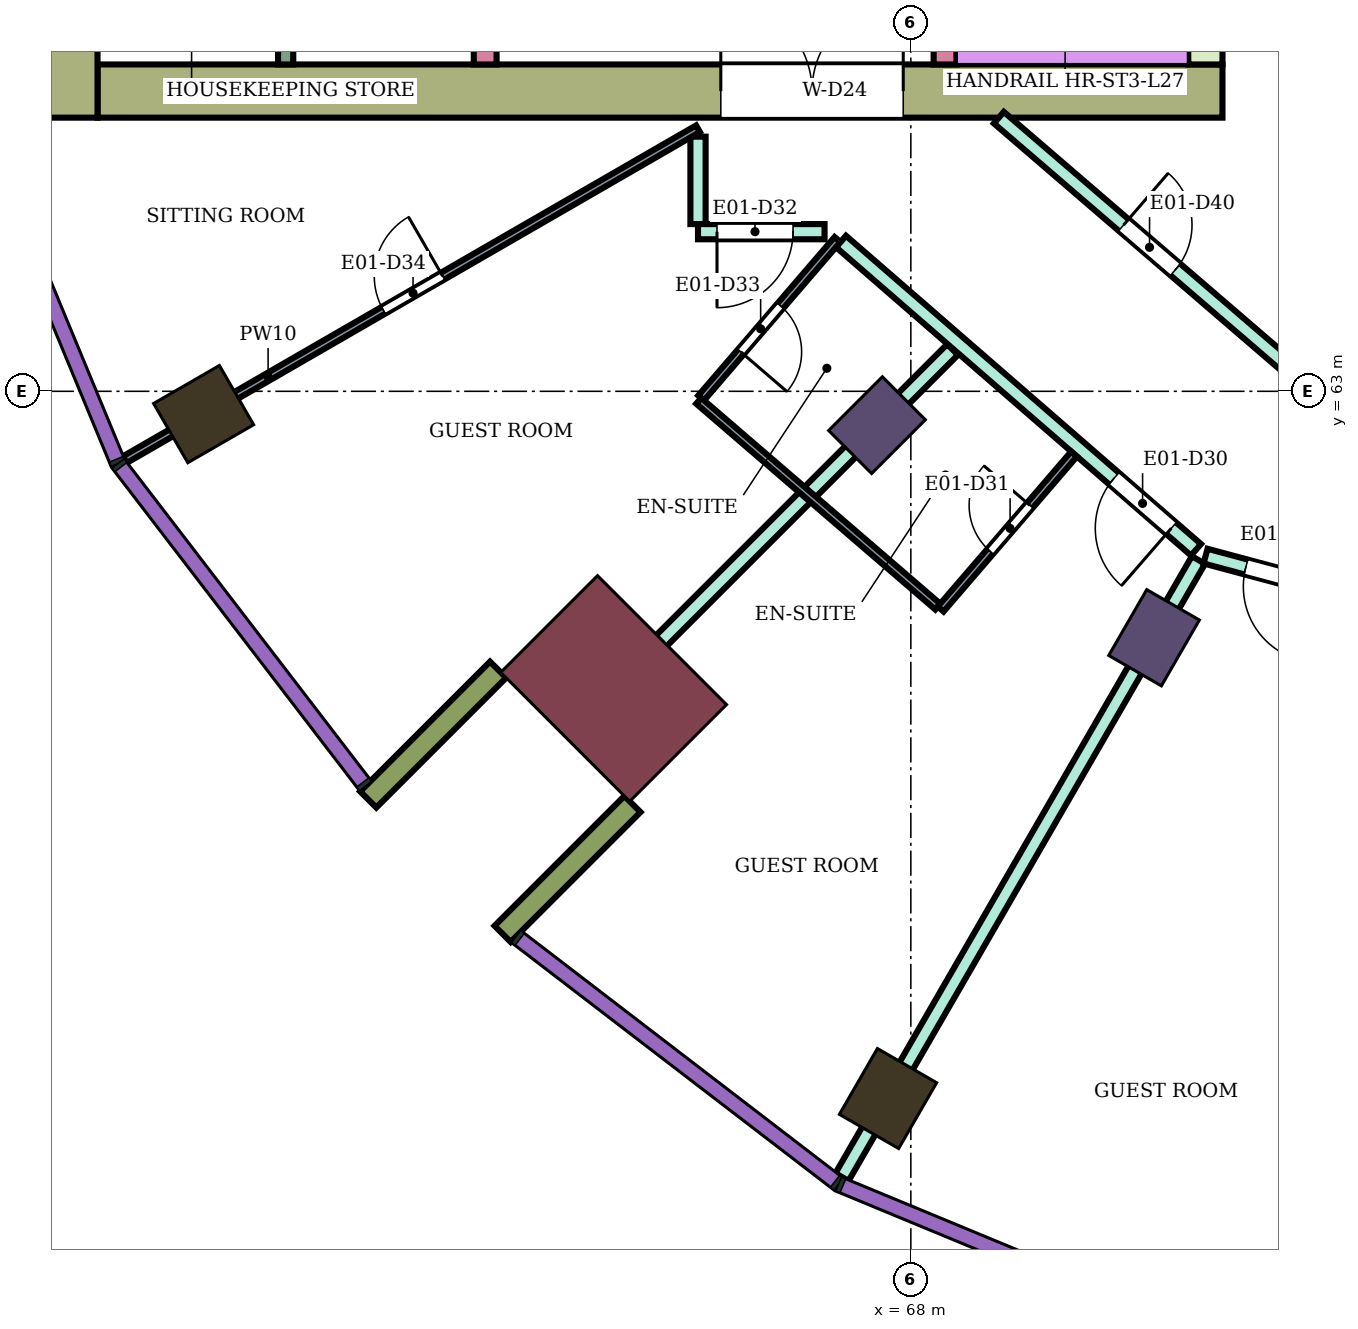
"""IFC4 building model, lengths in metres.
Left out: names, types, materials, properties, quantities, classifications, styles, units other than length and angle.
Written with IfcOpenShell. Run it as: python <this file> out.ifc"""

import sys

from ifc_helpers import new_model, si_unit, direction, frame, frame_2d, origin, origin_2d, place, context, subcontext, project, spatial, rectangle, extrude, element, fill, save


model = new_model("IFC4")
c1 = context("Model", 3, precision=1e-05, world=origin(), true_north=direction((0.0, 1.0)))
c2 = subcontext(c1, "Body", "Model", "MODEL_VIEW")
j1 = project(units=[si_unit("LENGTHUNIT", "METRE"), si_unit("PLANEANGLEUNIT", "RADIAN")], contexts=[c1])
p1 = place(None, origin())
s1 = spatial("IfcSite", under=j1, at=p1, CompositionType="ELEMENT")
p2 = place(p1, origin())
s2 = spatial("IfcBuilding", under=s1, at=p2, CompositionType="ELEMENT")
p3 = place(p2, frame((0.0, 0.0, 118.5)))
s3 = spatial("IfcBuildingStorey", under=s2, at=p3, CompositionType="ELEMENT", Elevation=118.5)
for number, where, z_axis, x_axis in (
    (1, (58.696, 62.7, 0.0), (0.0, 0.0, 1.0), (-0.866, -0.5, 0.0)),
    (2, (67.7, 53.696, 0.0), (0.0, 0.0, 1.0), (-0.5, -0.866, 0.0)),
):
    element("IfcColumn", number, at=place(p3, frame(where, z_axis=z_axis, x_axis=x_axis)), inside=s3, PredefinedType="COLUMN", context=c2, shape_type="SweptSolid", body=[
        extrude(rectangle(XDim=1.0, YDim=0.9, at=origin_2d()), origin(), (0.0, 0.0, 1.0), 3.9),
    ])
for number, where, z_axis, x_axis in (
    (3, (67.555, 62.555, 0.0), (0.0, 0.0, 1.0), (-0.707, -0.707, 0.0)),
    (4, (71.2, 59.758, 0.0), (0.0, 0.0, 1.0), (-0.5, -0.866, 0.0)),
):
    element("IfcColumn", number, at=place(p3, frame(where, z_axis=z_axis, x_axis=x_axis)), inside=s3, PredefinedType="COLUMN", context=c2, shape_type="SweptSolid", body=[
        extrude(rectangle(XDim=1.0, YDim=0.8, at=origin_2d()), origin(), (0.0, 0.0, 1.0), 3.9),
    ])
p4 = place(p3, frame((64.09, 59.09, 0.0), z_axis=(0.0, 0.0, 1.0), x_axis=(-0.707106781187, -0.707106781187, 0.0)))
e5 = element("IfcColumn", 5, at=p4, inside=s3, PredefinedType="COLUMN", context=c2, shape_type="SweptSolid", body=[
    extrude(rectangle(XDim=1.8, YDim=2.4, at=origin_2d()), origin(), (0.0, 0.0, 1.0), 3.9),
])
p5 = place(p3, frame((72.1, 66.95, 0.0), z_axis=(0.0, 0.0, 1.0), x_axis=(-1.0, 0.0, 0.0)))
e6 = element("IfcWall", 6, at=p5, inside=s3, PredefinedType="SHEAR", context=c2, shape_type="SweptSolid", body=[
    extrude(rectangle(XDim=14.8, YDim=0.7, at=frame_2d((7.4, 0.0))), origin(), (0.0, 0.0, 1.0), 3.58),
])
p6 = place(p5, frame((4.2, 0.0, 0.0)))
e7 = element("IfcOpeningElement", 7, at=p6, cuts=e6, PredefinedType="OPENING", context=c2, shape_type="SweptSolid", body=[
    extrude(rectangle(XDim=2.4, YDim=2.4, at=frame_2d((1.2, 1.2))), frame((0.0, 0.36, 0.0), z_axis=(0.0, -1.0, 0.0), x_axis=(1.0, 0.0, 0.0)), (0.0, 0.0, 1.0), 0.72),
])
p7 = place(p3, frame((71.875, 75.0, 0.0), z_axis=(0.0, 0.0, 1.0), x_axis=(0.0, -1.0, 0.0)))
e8 = element("IfcWall", 8, at=p7, inside=s3, PredefinedType="SHEAR", context=c2, shape_type="SweptSolid", body=[
    extrude(rectangle(XDim=7.7, YDim=0.45, at=frame_2d((3.85, 0.0))), origin(), (0.0, 0.0, 1.0), 3.58),
])
p8 = place(p3, frame((56.95, 83.4, 0.0), z_axis=(0.0, 0.0, 1.0), x_axis=(0.0, -1.0, 0.0)))
e9 = element("IfcWall", 9, at=p8, inside=s3, PredefinedType="SHEAR", context=c2, shape_type="SweptSolid", body=[
    extrude(rectangle(XDim=16.8, YDim=0.7, at=frame_2d((8.4, 0.0))), origin(), (0.0, 0.0, 1.0), 3.58),
])
p9 = place(p3, frame((68.45, 75.0, 0.0), z_axis=(0.0, 0.0, 1.0), x_axis=(0.0, -1.0, 0.0)))
e10 = element("IfcWall", 10, at=p9, inside=s3, PredefinedType="SHEAR", context=c2, shape_type="SweptSolid", body=[
    extrude(rectangle(XDim=7.7, YDim=0.3, at=frame_2d((3.85, 0.0))), origin(), (0.0, 0.0, 1.0), 3.58),
])
p10 = place(p9, frame((1.85, 0.0, 0.0)))
e11 = element("IfcOpeningElement", 11, at=p10, cuts=e10, PredefinedType="OPENING", context=c2, shape_type="SweptSolid", body=[
    extrude(rectangle(XDim=0.9, YDim=2.1, at=frame_2d((0.45, 1.05))), frame((0.0, 0.16, 0.0), z_axis=(0.0, -1.0, 0.0), x_axis=(1.0, 0.0, 0.0)), (0.0, 0.0, 1.0), 0.32),
])
p11 = place(p3, frame((62.4, 71.25, 0.0), z_axis=(0.0, 0.0, 1.0), x_axis=(0.0, -1.0, 0.0)))
e12 = element("IfcWall", 12, at=p11, inside=s3, PredefinedType="SHEAR", context=c2, shape_type="SweptSolid", body=[
    extrude(rectangle(XDim=3.95, YDim=0.3, at=frame_2d((1.975, 0.0))), origin(), (0.0, 0.0, 1.0), 3.58),
])
for number, where, z_axis, x_axis in (
    (13, (62.57, 59.338, 0.0), (0.0, 0.0, 1.0), (-0.707, -0.707, 0.0)),
    (14, (64.338, 57.57, 0.0), (0.0, 0.0, 1.0), (-0.707, -0.707, 0.0)),
):
    element("IfcWall", number, at=place(p3, frame(where, z_axis=z_axis, x_axis=x_axis)), inside=s3, PredefinedType="NOTDEFINED", context=c2, shape_type="SweptSolid", body=[
        extrude(rectangle(XDim=2.416, YDim=0.3, at=frame_2d((1.208, 0.0))), origin(), (0.0, 0.0, 1.0), 3.9),
    ])
p12 = place(p3, frame((63.596, 58.596, 0.0), z_axis=(0.0, 0.0, 1.0), x_axis=(0.707106781187, 0.707106781187, 0.0)))
e15 = element("IfcWall", 15, at=p12, inside=s3, PredefinedType="PARTITIONING", context=c2, shape_type="SweptSolid", body=[
    extrude(rectangle(XDim=7.005, YDim=0.2, at=frame_2d((3.503, 0.0))), origin(), (0.0, 0.0, 1.0), 3.45),
])
p13 = place(p3, frame((65.2, 65.2, 0.0), z_axis=(0.0, 0.0, 1.0), x_axis=(0.0, 1.0, 0.0)))
e16 = element("IfcWall", 16, at=p13, inside=s3, PredefinedType="PARTITIONING", context=c2, shape_type="SweptSolid", body=[
    extrude(rectangle(XDim=1.15, YDim=0.2, at=frame_2d((0.575, 0.0))), origin(), (0.0, 0.0, 1.0), 3.45),
])
p14 = place(p3, frame((65.2, 65.1, 0.0), z_axis=(0.0, 0.0, 1.0), x_axis=(1.0, 0.0, 0.0)))
e17 = element("IfcWall", 17, at=p14, inside=s3, PredefinedType="PARTITIONING", context=c2, shape_type="SweptSolid", body=[
    extrude(rectangle(XDim=1.665, YDim=0.2, at=frame_2d((0.833, 0.0))), origin(), (0.0, 0.0, 1.0), 3.45),
])
p15 = place(p14, frame((0.25, 0.0, 0.0)))
e18 = element("IfcOpeningElement", 18, at=p15, cuts=e17, PredefinedType="OPENING", context=c2, shape_type="SweptSolid", body=[
    extrude(rectangle(XDim=1.0, YDim=2.1, at=frame_2d((0.5, 1.05))), frame((0.0, 0.11, 0.0), z_axis=(0.0, -1.0, 0.0), x_axis=(1.0, 0.0, 0.0)), (0.0, 0.0, 1.0), 0.22),
])
p16 = place(p3, frame((67.081, 64.971, 0.0), z_axis=(0.0, 0.0, 1.0), x_axis=(0.755031061605, -0.65568902386, 0.0)))
e19 = element("IfcWall", 19, at=p16, inside=s3, PredefinedType="PARTITIONING", context=c2, shape_type="SweptSolid", body=[
    extrude(rectangle(XDim=6.186, YDim=0.2, at=frame_2d((3.093, 0.0))), origin(), (0.0, 0.0, 1.0), 3.45),
])
p17 = place(p16, frame((4.755, 0.0, 0.0)))
e20 = element("IfcOpeningElement", 20, at=p17, cuts=e19, PredefinedType="OPENING", context=c2, shape_type="SweptSolid", body=[
    extrude(rectangle(XDim=1.0, YDim=2.1, at=frame_2d((0.5, 1.05))), frame((0.0, 0.11, 0.0), z_axis=(0.0, -1.0, 0.0), x_axis=(1.0, 0.0, 0.0)), (0.0, 0.0, 1.0), 0.22),
])
p18 = place(p3, frame((67.094, 52.663, 0.0), z_axis=(0.0, 0.0, 1.0), x_axis=(0.500228134253, 0.865893650342, 0.0)))
e21 = element("IfcWall", 21, at=p18, inside=s3, PredefinedType="PARTITIONING", context=c2, shape_type="SweptSolid", body=[
    extrude(rectangle(XDim=9.375, YDim=0.2, at=frame_2d((4.687, 0.0))), origin(), (0.0, 0.0, 1.0), 3.45),
])
p19 = place(p3, frame((69.158, 66.6, 0.0), z_axis=(0.0, 0.0, 1.0), x_axis=(0.758063092745, -0.652181222835, 0.0)))
e22 = element("IfcWall", 22, at=p19, inside=s3, PredefinedType="PARTITIONING", context=c2, shape_type="SweptSolid", body=[
    extrude(rectangle(XDim=5.16, YDim=0.2, at=frame_2d((2.58, 0.0))), origin(), (0.0, 0.0, 1.0), 3.45),
])
p20 = place(p19, frame((2.165, 0.0, 0.0)))
e23 = element("IfcOpeningElement", 23, at=p20, cuts=e22, PredefinedType="OPENING", context=c2, shape_type="SweptSolid", body=[
    extrude(rectangle(XDim=0.9, YDim=2.1, at=frame_2d((0.45, 1.05))), frame((0.0, 0.11, 0.0), z_axis=(0.0, -1.0, 0.0), x_axis=(1.0, 0.0, 0.0)), (0.0, 0.0, 1.0), 0.22),
])
p21 = place(p3, frame((71.877, 60.832, 0.0), z_axis=(0.0, 0.0, 1.0), x_axis=(0.965857276008, -0.259074742848, 0.0)))
e24 = element("IfcWall", 24, at=p21, inside=s3, PredefinedType="PARTITIONING", context=c2, shape_type="SweptSolid", body=[
    extrude(rectangle(XDim=8.36, YDim=0.2, at=frame_2d((4.18, 0.0))), origin(), (0.0, 0.0, 1.0), 3.45),
])
p22 = place(p21, frame((0.55, 0.0, 0.0)))
e25 = element("IfcOpeningElement", 25, at=p22, cuts=e24, PredefinedType="OPENING", context=c2, shape_type="SweptSolid", body=[
    extrude(rectangle(XDim=1.0, YDim=2.1, at=frame_2d((0.5, 1.05))), frame((0.0, 0.11, 0.0), z_axis=(0.0, -1.0, 0.0), x_axis=(1.0, 0.0, 0.0)), (0.0, 0.0, 1.0), 0.22),
])
p23 = place(p3, frame((57.659, 62.101, 0.0), z_axis=(0.0, 0.0, 1.0), x_axis=(0.86602264145, 0.500004784474, 0.0)))
e26 = element("IfcWall", 26, at=p23, inside=s3, PredefinedType="PARTITIONING", context=c2, shape_type="SweptSolid", body=[
    extrude(rectangle(XDim=8.708, YDim=0.1, at=frame_2d((4.354, 0.0))), origin(), (0.0, 0.0, 1.0), 3.45),
])
p24 = place(p23, frame((3.929, 0.0, 0.0)))
e27 = element("IfcOpeningElement", 27, at=p24, cuts=e26, PredefinedType="OPENING", context=c2, shape_type="SweptSolid", body=[
    extrude(rectangle(XDim=0.9, YDim=2.1, at=frame_2d((0.45, 1.05))), frame((0.0, 0.06, 0.0), z_axis=(0.0, -1.0, 0.0), x_axis=(1.0, 0.0, 0.0)), (0.0, 0.0, 1.0), 0.12),
])
p25 = place(p3, frame((65.242, 62.912, 0.0), z_axis=(0.0, 0.0, 1.0), x_axis=(0.652069888227, 0.758158862553, 0.0)))
e28 = element("IfcWall", 28, at=p25, inside=s3, PredefinedType="PARTITIONING", context=c2, shape_type="SweptSolid", body=[
    extrude(rectangle(XDim=2.75, YDim=0.1, at=frame_2d((1.375, 0.0))), origin(), (0.0, 0.0, 1.0), 3.45),
])
p26 = place(p25, frame((0.8, 0.0, 0.0)))
e29 = element("IfcOpeningElement", 29, at=p26, cuts=e28, PredefinedType="OPENING", context=c2, shape_type="SweptSolid", body=[
    extrude(rectangle(XDim=0.8, YDim=2.1, at=frame_2d((0.4, 1.05))), frame((0.0, 0.06, 0.0), z_axis=(0.0, -1.0, 0.0), x_axis=(1.0, 0.0, 0.0)), (0.0, 0.0, 1.0), 0.12),
])
p27 = place(p3, frame((65.209, 62.875, 0.0), z_axis=(0.0, 0.0, 1.0), x_axis=(0.757930378138, -0.652335451969, 0.0)))
e30 = element("IfcWall", 30, at=p27, inside=s3, PredefinedType="PARTITIONING", context=c2, shape_type="SweptSolid", body=[
    extrude(rectangle(XDim=4.15, YDim=0.1, at=frame_2d((2.075, 0.0))), origin(), (0.0, 0.0, 1.0), 3.45),
])
p28 = place(p3, frame((68.393, 60.135, 0.0), z_axis=(0.0, 0.0, 1.0), x_axis=(0.652061182569, 0.758166349944, 0.0)))
e31 = element("IfcWall", 31, at=p28, inside=s3, PredefinedType="PARTITIONING", context=c2, shape_type="SweptSolid", body=[
    extrude(rectangle(XDim=2.69, YDim=0.1, at=frame_2d((1.345, 0.0))), origin(), (0.0, 0.0, 1.0), 3.45),
])
p29 = place(p28, frame((1.0, 0.0, 0.0)))
e32 = element("IfcOpeningElement", 32, at=p29, cuts=e31, PredefinedType="OPENING", context=c2, shape_type="SweptSolid", body=[
    extrude(rectangle(XDim=0.8, YDim=2.1, at=frame_2d((0.4, 1.05))), frame((0.0, 0.06, 0.0), z_axis=(0.0, -1.0, 0.0), x_axis=(1.0, 0.0, 0.0)), (0.0, 0.0, 1.0), 0.12),
])
p30 = place(p3, frame((59.775, 70.95, 0.0), z_axis=(0.0, 0.0, 1.0), x_axis=(0.0, -1.0, 0.0)))
e33 = element("IfcWall", 33, at=p30, inside=s3, PredefinedType="PARTITIONING", context=c2, shape_type="SweptSolid", body=[
    extrude(rectangle(XDim=3.65, YDim=0.2, at=frame_2d((1.825, 0.0))), origin(), (0.0, 0.0, 1.0), 3.58),
])
p31 = place(p22, frame((1.0, 0.0, 0.0), z_axis=(0.0, 0.0, 1.0), x_axis=(-1.0, 0.0, 0.0)))
e34 = element("IfcDoor", 34, at=p31, inside=s3, OperationType="SINGLE_SWING_LEFT", PredefinedType="DOOR", context=c2, shape_type="SweptSolid", body=[
    extrude(rectangle(XDim=1.0, YDim=2.1, at=frame_2d((0.5, 1.05))), frame((0.0, 0.025, 0.0), z_axis=(0.0, -1.0, 0.0), x_axis=(1.0, 0.0, 0.0)), (0.0, 0.0, 1.0), 0.05),
])
fill(e25, e34)
p32 = place(p17, frame((1.0, 0.0, 0.0), z_axis=(0.0, 0.0, 1.0), x_axis=(-1.0, 0.0, 0.0)))
e35 = element("IfcDoor", 35, at=p32, inside=s3, OperationType="SINGLE_SWING_LEFT", PredefinedType="DOOR", context=c2, shape_type="SweptSolid", body=[
    extrude(rectangle(XDim=1.0, YDim=2.1, at=frame_2d((0.5, 1.05))), frame((0.0, 0.025, 0.0), z_axis=(0.0, -1.0, 0.0), x_axis=(1.0, 0.0, 0.0)), (0.0, 0.0, 1.0), 0.05),
])
fill(e20, e35)
p33 = place(p29, origin())
e36 = element("IfcDoor", 36, at=p33, inside=s3, OperationType="SINGLE_SWING_RIGHT", PredefinedType="DOOR", context=c2, shape_type="SweptSolid", body=[
    extrude(rectangle(XDim=0.8, YDim=2.1, at=frame_2d((0.4, 1.05))), frame((0.0, 0.025, 0.0), z_axis=(0.0, -1.0, 0.0), x_axis=(1.0, 0.0, 0.0)), (0.0, 0.0, 1.0), 0.05),
])
fill(e32, e36)
p34 = place(p15, frame((1.0, 0.0, 0.0), z_axis=(0.0, 0.0, 1.0), x_axis=(-1.0, 0.0, 0.0)))
e37 = element("IfcDoor", 37, at=p34, inside=s3, OperationType="SINGLE_SWING_RIGHT", PredefinedType="DOOR", context=c2, shape_type="SweptSolid", body=[
    extrude(rectangle(XDim=1.0, YDim=2.1, at=frame_2d((0.5, 1.05))), frame((0.0, 0.025, 0.0), z_axis=(0.0, -1.0, 0.0), x_axis=(1.0, 0.0, 0.0)), (0.0, 0.0, 1.0), 0.05),
])
fill(e18, e37)
p35 = place(p26, frame((0.8, 0.0, 0.0), z_axis=(0.0, 0.0, 1.0), x_axis=(-1.0, 0.0, 0.0)))
e38 = element("IfcDoor", 38, at=p35, inside=s3, OperationType="SINGLE_SWING_RIGHT", PredefinedType="DOOR", context=c2, shape_type="SweptSolid", body=[
    extrude(rectangle(XDim=0.8, YDim=2.1, at=frame_2d((0.4, 1.05))), frame((0.0, 0.025, 0.0), z_axis=(0.0, -1.0, 0.0), x_axis=(1.0, 0.0, 0.0)), (0.0, 0.0, 1.0), 0.05),
])
fill(e29, e38)
p36 = place(p24, origin())
e39 = element("IfcDoor", 39, at=p36, inside=s3, OperationType="SINGLE_SWING_RIGHT", PredefinedType="DOOR", context=c2, shape_type="SweptSolid", body=[
    extrude(rectangle(XDim=0.9, YDim=2.1, at=frame_2d((0.45, 1.05))), frame((0.0, 0.025, 0.0), z_axis=(0.0, -1.0, 0.0), x_axis=(1.0, 0.0, 0.0)), (0.0, 0.0, 1.0), 0.05),
])
fill(e27, e39)
p37 = place(p20, origin())
e40 = element("IfcDoor", 40, at=p37, inside=s3, OperationType="SINGLE_SWING_LEFT", PredefinedType="DOOR", context=c2, shape_type="SweptSolid", body=[
    extrude(rectangle(XDim=0.9, YDim=2.1, at=frame_2d((0.45, 1.05))), frame((0.0, 0.025, 0.0), z_axis=(0.0, -1.0, 0.0), x_axis=(1.0, 0.0, 0.0)), (0.0, 0.0, 1.0), 0.05),
])
fill(e23, e40)
p38 = place(p6, frame((2.4, 0.0, 0.0), z_axis=(0.0, 0.0, 1.0), x_axis=(-1.0, 0.0, 0.0)))
e41 = element("IfcDoor", 41, at=p38, inside=s3, OperationType="DOUBLE_DOOR_SINGLE_SWING", PredefinedType="DOOR", context=c2, shape_type="SweptSolid", body=[
    extrude(rectangle(XDim=2.4, YDim=2.4, at=frame_2d((1.2, 1.2))), frame((0.0, 0.025, 0.0), z_axis=(0.0, -1.0, 0.0), x_axis=(1.0, 0.0, 0.0)), (0.0, 0.0, 1.0), 0.05),
])
fill(e7, e41)
save(model, sys.argv[1])
